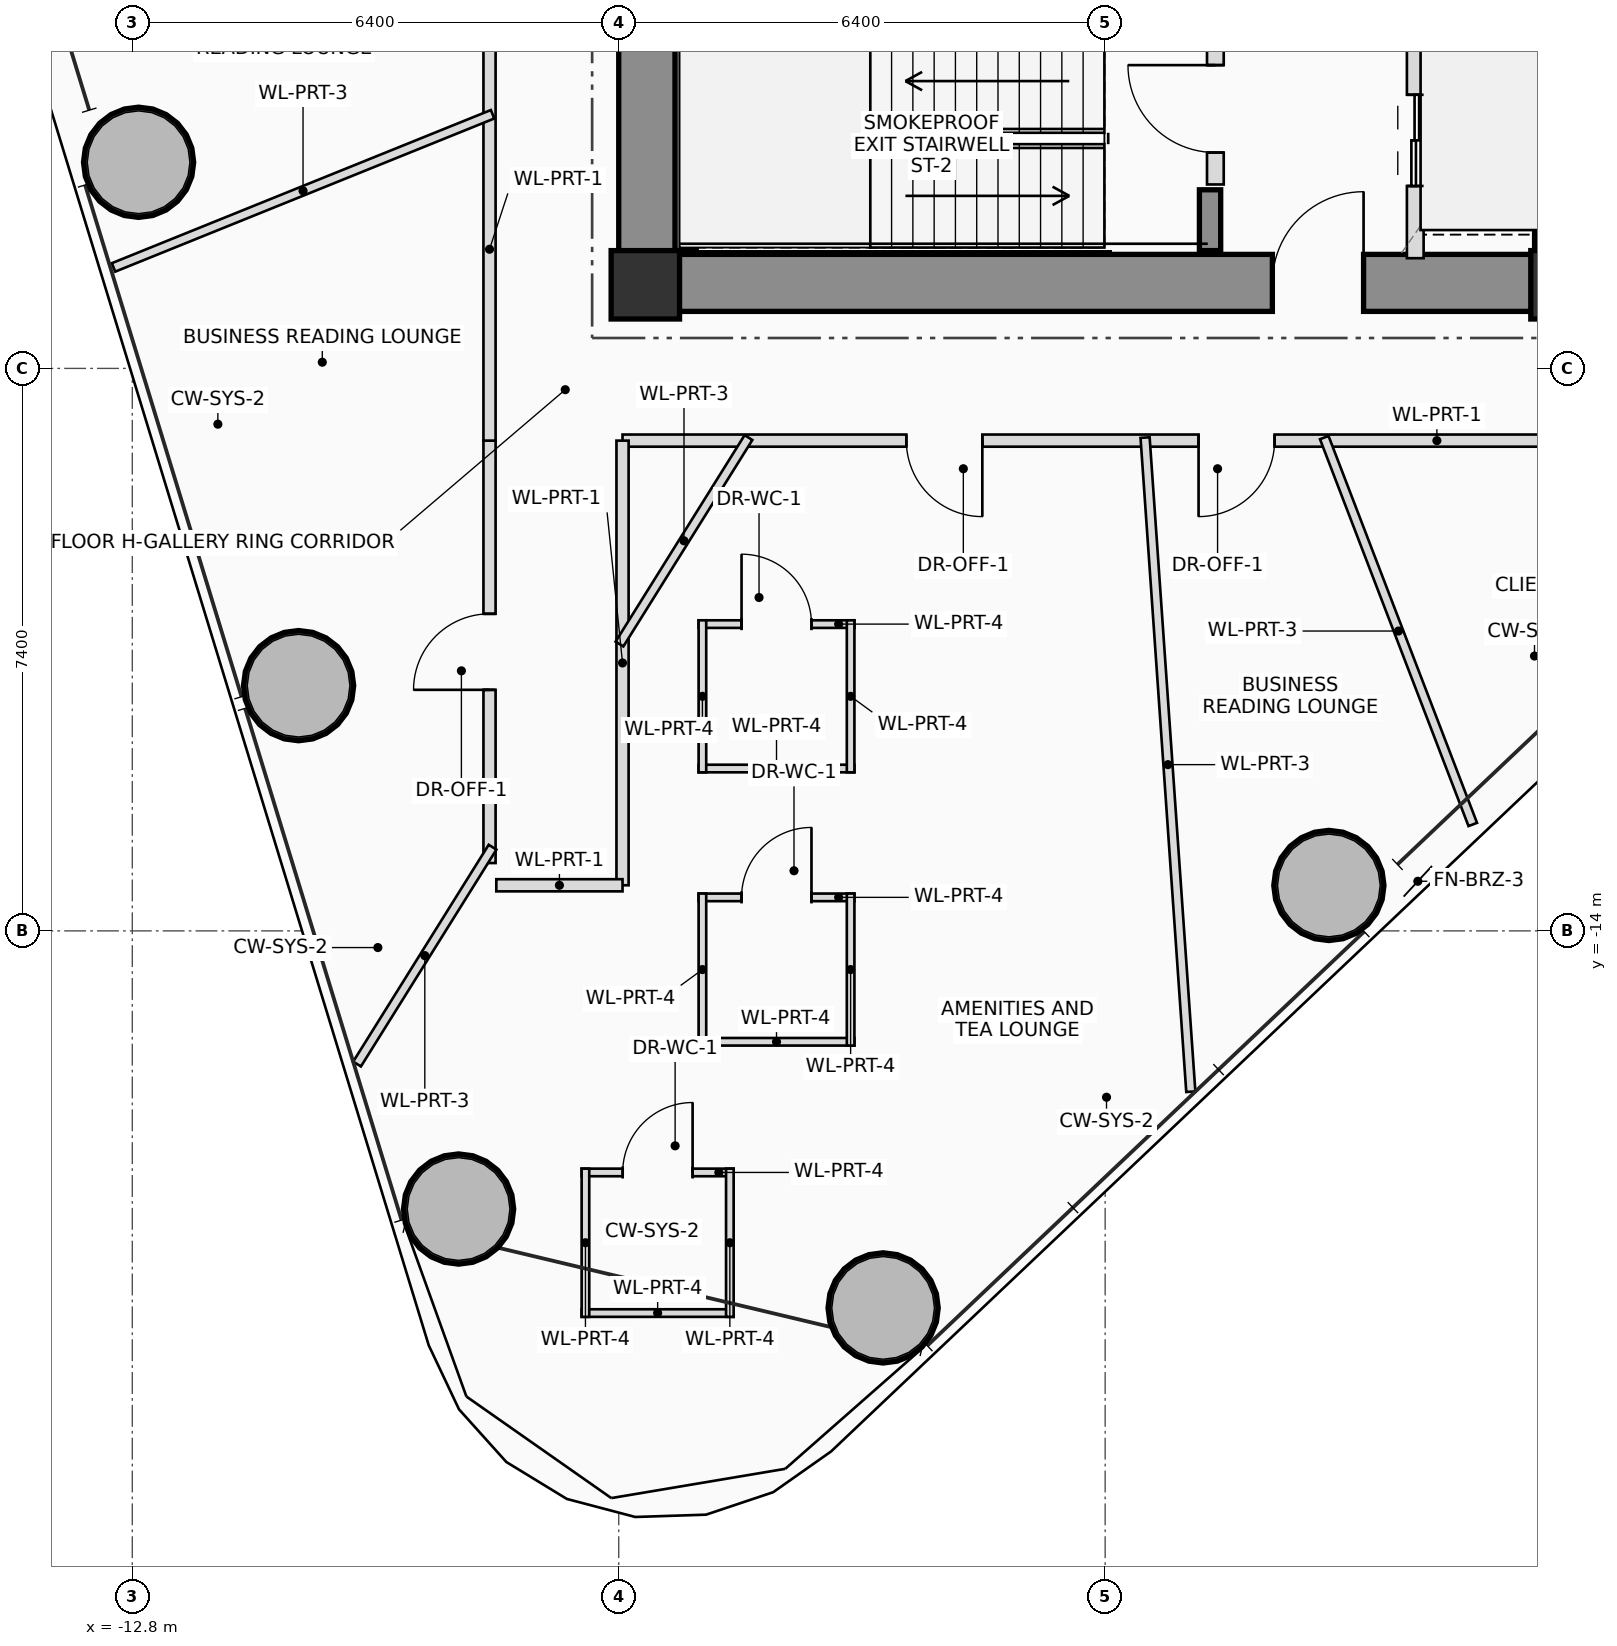
"""IFC4 building model, lengths in metres.
Left out: names, types, materials, properties, quantities, classifications, styles, units other than length and angle.
Written with IfcOpenShell. Run it as: python <this file> out.ifc"""

import sys

from ifc_helpers import new_model, si_unit, direction, frame, frame_2d, origin, origin_2d, place, context, subcontext, project, spatial, rectangle, hollow_circle, extrude, source, transform, mapped, element, fill, save


model = new_model("IFC4")
c1 = context("Model", 3, precision=1e-05, world=origin(), true_north=direction((0.0, 1.0)))
c2 = subcontext(c1, "Body", "Model", "MODEL_VIEW")
j1 = project(units=[si_unit("LENGTHUNIT", "METRE"), si_unit("PLANEANGLEUNIT", "RADIAN")], contexts=[c1])
p1 = place(None, origin())
s1 = spatial("IfcSite", under=j1, at=p1, CompositionType="ELEMENT")
p2 = place(p1, origin())
s2 = spatial("IfcBuilding", under=s1, at=p2, CompositionType="ELEMENT")
p3 = place(p2, frame((0.0, 0.0, 108.65)))
s3 = spatial("IfcBuildingStorey", under=s2, at=p3, CompositionType="ELEMENT", Elevation=108.65)
m1 = source(origin(), c2, "Body", "SweptSolid", [
    extrude(rectangle(XDim=0.9, YDim=0.9, at=origin_2d()), origin(), (0.0, 0.0, 1.0), 3.75),
])
for number, where, z_axis, x_axis in (
    (1, (-6.05, -5.5, 0.0), (0.0, 0.0, 1.0), (1.0, 0.0, 0.0)),
    (2, (6.05, -5.5, 0.0), (0.0, 0.0, 1.0), (1.0, 0.0, 0.0)),
):
    element("IfcColumn", number, at=place(p3, frame(where, z_axis=z_axis, x_axis=x_axis)), inside=s3, PredefinedType="COLUMN", context=c2, shape_type="MappedRepresentation", body=[
        mapped(m1, transform((0.0, 0.0, 0.0), scale=1.0)),
    ])
p4 = place(p3, frame((-6.4, -5.475, 0.0), z_axis=(0.0, 0.0, 1.0), x_axis=(1.0, 0.0, 0.0)))
e3 = element("IfcWall", 3, at=p4, inside=s3, PredefinedType="SHEAR", context=c2, shape_type="SweptSolid", body=[
    extrude(rectangle(XDim=12.8, YDim=0.75, at=frame_2d((6.4, 0.0))), origin(), (0.0, 0.0, 1.0), 3.75),
])
p5 = place(p4, frame((8.6, 0.0, 0.0)))
e4 = element("IfcOpeningElement", 4, at=p5, cuts=e3, PredefinedType="OPENING", context=c2, shape_type="SweptSolid", body=[
    extrude(rectangle(XDim=1.2, YDim=2.2, at=frame_2d((0.6, 1.1))), frame((0.0, 0.385, 0.0), z_axis=(0.0, -1.0, 0.0), x_axis=(1.0, 0.0, 0.0)), (0.0, 0.0, 1.0), 0.77),
])
p6 = place(p3, frame((6.025, -5.1, 0.0), z_axis=(0.0, 0.0, 1.0), x_axis=(0.0, 1.0, 0.0)))
e5 = element("IfcWall", 5, at=p6, inside=s3, PredefinedType="SHEAR", context=c2, shape_type="SweptSolid", body=[
    extrude(rectangle(XDim=10.2, YDim=0.75, at=frame_2d((5.1, 0.0))), origin(), (0.0, 0.0, 1.0), 3.75),
])
p7 = place(p3, frame((-6.025, -5.1, 0.0), z_axis=(0.0, 0.0, 1.0), x_axis=(0.0, 1.0, 0.0)))
e6 = element("IfcWall", 6, at=p7, inside=s3, PredefinedType="SHEAR", context=c2, shape_type="SweptSolid", body=[
    extrude(rectangle(XDim=3.35, YDim=0.75, at=frame_2d((1.675, 0.0))), origin(), (0.0, 0.0, 1.0), 3.75),
])
p8 = place(p3, frame((-5.52, -5.05, 0.0), z_axis=(0.0, 0.0, 1.0), x_axis=(0.0, 1.0, 0.0)))
e7 = element("IfcWall", 7, at=p8, inside=s3, PredefinedType="SHEAR", context=c2, shape_type="SweptSolid", body=[
    extrude(rectangle(XDim=2.75, YDim=0.28, at=frame_2d((1.375, 0.0))), origin(), (0.0, 0.0, 1.0), 3.75),
])
p9 = place(p3, frame((1.38, -5.05, 0.0), z_axis=(0.0, 0.0, 1.0), x_axis=(0.0, 1.0, 0.0)))
e8 = element("IfcWall", 8, at=p9, inside=s3, PredefinedType="SHEAR", context=c2, shape_type="SweptSolid", body=[
    extrude(rectangle(XDim=0.8, YDim=0.28, at=frame_2d((0.4, 0.0))), origin(), (0.0, 0.0, 1.0), 3.75),
])
m2 = source(origin(), c2, "Body", "SweptSolid", [
    extrude(hollow_circle(Radius=0.725, WallThickness=0.05, at=origin_2d()), origin(), (0.0, 0.0, 1.0), 3.75),
])
for number, where, z_axis, x_axis in (
    (9, (-2.921, -18.96, 0.0), (0.0, 0.0, 1.0), (1.0, 0.0, 0.0)),
    (10, (2.943, -13.402, 0.0), (0.0, 0.0, 1.0), (1.0, 0.0, 0.0)),
    (11, (-12.717, -3.888, 0.0), (0.0, 0.0, 1.0), (1.0, 0.0, 0.0)),
    (12, (-10.612, -10.774, 0.0), (0.0, 0.0, 1.0), (1.0, 0.0, 0.0)),
    (13, (-8.507, -17.659, 0.0), (0.0, 0.0, 1.0), (1.0, 0.0, 0.0)),
):
    element("IfcColumn", number, at=place(p3, frame(where, z_axis=z_axis, x_axis=x_axis)), inside=s3, PredefinedType="COLUMN", context=c2, shape_type="MappedRepresentation", body=[
        mapped(m2, transform((0.0, 0.0, 0.0), scale=1.0)),
    ])
p10 = place(p3, frame((1.45, -4.18, 0.0), z_axis=(0.0, 0.0, 1.0), x_axis=(0.0, 1.0, 0.0)))
e14 = element("IfcWall", 14, at=p10, inside=s3, PredefinedType="PLUMBINGWALL", context=c2, shape_type="SweptSolid", body=[
    extrude(rectangle(XDim=1.98, YDim=0.22, at=frame_2d((0.99, 0.0))), origin(), (0.0, 0.0, 1.0), 3.545),
])
p11 = place(p10, frame((0.42, 0.0, 0.0)))
e15 = element("IfcOpeningElement", 15, at=p11, cuts=e14, PredefinedType="OPENING", context=c2, shape_type="SweptSolid", body=[
    extrude(rectangle(XDim=1.15, YDim=2.15, at=frame_2d((0.575, 1.075))), frame((0.0, 0.12, 0.0), z_axis=(0.0, -1.0, 0.0), x_axis=(1.0, 0.0, 0.0)), (0.0, 0.0, 1.0), 0.24),
])
p12 = place(p3, frame((4.08, -5.15, 0.0), z_axis=(0.0, 0.0, 1.0), x_axis=(0.0, 1.0, 0.0)))
e16 = element("IfcWall", 16, at=p12, inside=s3, PredefinedType="PLUMBINGWALL", context=c2, shape_type="SweptSolid", body=[
    extrude(rectangle(XDim=2.95, YDim=0.22, at=frame_2d((1.475, 0.0))), origin(), (0.0, 0.0, 1.0), 3.545),
])
p13 = place(p12, frame((0.95, 0.0, 0.0)))
e17 = element("IfcOpeningElement", 17, at=p13, cuts=e16, PredefinedType="OPENING", context=c2, shape_type="SweptSolid", body=[
    extrude(rectangle(XDim=1.2, YDim=2.25, at=frame_2d((0.6, 1.125))), frame((0.0, 0.12, 0.0), z_axis=(0.0, -1.0, 0.0), x_axis=(1.0, 0.0, 0.0)), (0.0, 0.0, 1.0), 0.24),
])
p14 = place(p3, frame((-5.349, -13.559, 0.0), z_axis=(0.0, 0.0, 1.0), x_axis=(1.0, 0.0, 0.0)))
e18 = element("IfcWall", 18, at=p14, inside=s3, PredefinedType="PARTITIONING", context=c2, shape_type="SweptSolid", body=[
    extrude(rectangle(XDim=2.05, YDim=0.1, at=frame_2d((1.025, 0.0))), origin(), (0.0, 0.0, 1.0), 2.85),
])
p15 = place(p14, frame((0.565, 0.0, 0.0)))
e19 = element("IfcOpeningElement", 19, at=p15, cuts=e18, PredefinedType="OPENING", context=c2, shape_type="SweptSolid", body=[
    extrude(rectangle(XDim=0.92, YDim=2.1, at=frame_2d((0.46, 1.05))), frame((0.0, 0.06, 0.0), z_axis=(0.0, -1.0, 0.0), x_axis=(1.0, 0.0, 0.0)), (0.0, 0.0, 1.0), 0.12),
])
p16 = place(p3, frame((-3.299, -15.459, 0.0), z_axis=(0.0, 0.0, 1.0), x_axis=(-1.0, 0.0, 0.0)))
e20 = element("IfcWall", 20, at=p16, inside=s3, PredefinedType="PARTITIONING", context=c2, shape_type="SweptSolid", body=[
    extrude(rectangle(XDim=2.05, YDim=0.1, at=frame_2d((1.025, 0.0))), origin(), (0.0, 0.0, 1.0), 2.85),
])
for number, where, z_axis, x_axis in (
    (21, (-3.349, -13.509, 0.0), (0.0, 0.0, 1.0), (0.0, -1.0, 0.0)),
    (22, (-5.299, -15.509, 0.0), (0.0, 0.0, 1.0), (0.0, 1.0, 0.0)),
):
    element("IfcWall", number, at=place(p3, frame(where, z_axis=z_axis, x_axis=x_axis)), inside=s3, PredefinedType="PARTITIONING", context=c2, shape_type="SweptSolid", body=[
        extrude(rectangle(XDim=2.0, YDim=0.1, at=frame_2d((1.0, 0.0))), origin(), (0.0, 0.0, 1.0), 3.2),
    ])
p17 = place(p3, frame((-5.349, -9.964, 0.0), z_axis=(0.0, 0.0, 1.0), x_axis=(1.0, 0.0, 0.0)))
e23 = element("IfcWall", 23, at=p17, inside=s3, PredefinedType="PARTITIONING", context=c2, shape_type="SweptSolid", body=[
    extrude(rectangle(XDim=2.05, YDim=0.1, at=frame_2d((1.025, 0.0))), origin(), (0.0, 0.0, 1.0), 2.85),
])
p18 = place(p17, frame((0.565, 0.0, 0.0)))
e24 = element("IfcOpeningElement", 24, at=p18, cuts=e23, PredefinedType="OPENING", context=c2, shape_type="SweptSolid", body=[
    extrude(rectangle(XDim=0.92, YDim=2.1, at=frame_2d((0.46, 1.05))), frame((0.0, 0.06, 0.0), z_axis=(0.0, -1.0, 0.0), x_axis=(1.0, 0.0, 0.0)), (0.0, 0.0, 1.0), 0.12),
])
p19 = place(p3, frame((-3.299, -11.864, 0.0), z_axis=(0.0, 0.0, 1.0), x_axis=(-1.0, 0.0, 0.0)))
e25 = element("IfcWall", 25, at=p19, inside=s3, PredefinedType="PARTITIONING", context=c2, shape_type="SweptSolid", body=[
    extrude(rectangle(XDim=2.05, YDim=0.1, at=frame_2d((1.025, 0.0))), origin(), (0.0, 0.0, 1.0), 2.85),
])
for number, where, z_axis, x_axis in (
    (26, (-3.349, -9.914, 0.0), (0.0, 0.0, 1.0), (0.0, -1.0, 0.0)),
    (27, (-5.299, -11.914, 0.0), (0.0, 0.0, 1.0), (0.0, 1.0, 0.0)),
):
    element("IfcWall", number, at=place(p3, frame(where, z_axis=z_axis, x_axis=x_axis)), inside=s3, PredefinedType="PARTITIONING", context=c2, shape_type="SweptSolid", body=[
        extrude(rectangle(XDim=2.0, YDim=0.1, at=frame_2d((1.0, 0.0))), origin(), (0.0, 0.0, 1.0), 3.2),
    ])
p20 = place(p3, frame((-6.888, -17.178, 0.0), z_axis=(0.0, 0.0, 1.0), x_axis=(1.0, 0.0, 0.0)))
e28 = element("IfcWall", 28, at=p20, inside=s3, PredefinedType="PARTITIONING", context=c2, shape_type="SweptSolid", body=[
    extrude(rectangle(XDim=2.0, YDim=0.1, at=frame_2d((1.0, 0.0))), origin(), (0.0, 0.0, 1.0), 3.545),
])
p21 = place(p20, frame((0.54, 0.0, 0.0)))
e29 = element("IfcOpeningElement", 29, at=p21, cuts=e28, PredefinedType="OPENING", context=c2, shape_type="SweptSolid", body=[
    extrude(rectangle(XDim=0.92, YDim=2.1, at=frame_2d((0.46, 1.05))), frame((0.0, 0.06, 0.0), z_axis=(0.0, -1.0, 0.0), x_axis=(1.0, 0.0, 0.0)), (0.0, 0.0, 1.0), 0.12),
])
p22 = place(p3, frame((-4.888, -19.028, 0.0), z_axis=(0.0, 0.0, 1.0), x_axis=(-1.0, 0.0, 0.0)))
e30 = element("IfcWall", 30, at=p22, inside=s3, PredefinedType="PARTITIONING", context=c2, shape_type="SweptSolid", body=[
    extrude(rectangle(XDim=2.0, YDim=0.1, at=frame_2d((1.0, 0.0))), origin(), (0.0, 0.0, 1.0), 3.545),
])
for number, where, z_axis, x_axis in (
    (31, (-4.938, -17.128, 0.0), (0.0, 0.0, 1.0), (0.0, -1.0, 0.0)),
    (32, (-6.838, -19.078, 0.0), (0.0, 0.0, 1.0), (0.0, 1.0, 0.0)),
):
    element("IfcWall", number, at=place(p3, frame(where, z_axis=z_axis, x_axis=x_axis)), inside=s3, PredefinedType="PARTITIONING", context=c2, shape_type="SweptSolid", body=[
        extrude(rectangle(XDim=1.95, YDim=0.1, at=frame_2d((0.975, 0.0))), origin(), (0.0, 0.0, 1.0), 3.01),
    ])
p23 = place(p3, frame((-8.1, -13.107, 0.0), z_axis=(0.0, 0.0, 1.0), x_axis=(0.0, 1.0, 0.0)))
e33 = element("IfcWall", 33, at=p23, inside=s3, PredefinedType="PARTITIONING", context=c2, shape_type="SweptSolid", body=[
    extrude(rectangle(XDim=5.557, YDim=0.16, at=frame_2d((2.779, 0.0))), origin(), (0.0, 0.0, 1.0), 2.85),
])
p24 = place(p23, frame((2.279, 0.0, 0.0)))
e34 = element("IfcOpeningElement", 34, at=p24, cuts=e33, PredefinedType="OPENING", context=c2, shape_type="SweptSolid", body=[
    extrude(rectangle(XDim=1.0, YDim=2.25, at=frame_2d((0.5, 1.125))), frame((0.0, 0.09, 0.0), z_axis=(0.0, -1.0, 0.0), x_axis=(1.0, 0.0, 0.0)), (0.0, 0.0, 1.0), 0.18),
])
p25 = place(p3, frame((-8.1, -7.55, 0.0), z_axis=(0.0, 0.0, 1.0), x_axis=(0.0, 1.0, 0.0)))
e35 = element("IfcWall", 35, at=p25, inside=s3, PredefinedType="PARTITIONING", context=c2, shape_type="SweptSolid", body=[
    extrude(rectangle(XDim=15.1, YDim=0.16, at=frame_2d((7.55, 0.0))), origin(), (0.0, 0.0, 1.0), 2.85),
])
p26 = place(p25, frame((5.185, 0.0, 0.0)))
e36 = element("IfcOpeningElement", 36, at=p26, cuts=e35, PredefinedType="OPENING", context=c2, shape_type="SweptSolid", body=[
    extrude(rectangle(XDim=1.0, YDim=2.25, at=frame_2d((0.5, 1.125))), frame((0.0, 0.09, 0.0), z_axis=(0.0, -1.0, 0.0), x_axis=(1.0, 0.0, 0.0)), (0.0, 0.0, 1.0), 0.18),
])
p27 = place(p25, frame((9.39, 0.0, 0.0)))
e37 = element("IfcOpeningElement", 37, at=p27, cuts=e35, PredefinedType="OPENING", context=c2, shape_type="SweptSolid", body=[
    extrude(rectangle(XDim=1.0, YDim=2.25, at=frame_2d((0.5, 1.125))), frame((0.0, 0.09, 0.0), z_axis=(0.0, -1.0, 0.0), x_axis=(1.0, 0.0, 0.0)), (0.0, 0.0, 1.0), 0.18),
])
p28 = place(p25, frame((13.607, 0.0, 0.0)))
e38 = element("IfcOpeningElement", 38, at=p28, cuts=e35, PredefinedType="OPENING", context=c2, shape_type="SweptSolid", body=[
    extrude(rectangle(XDim=1.0, YDim=2.25, at=frame_2d((0.5, 1.125))), frame((0.0, 0.09, 0.0), z_axis=(0.0, -1.0, 0.0), x_axis=(1.0, 0.0, 0.0)), (0.0, 0.0, 1.0), 0.18),
])
p29 = place(p3, frame((6.35, -7.55, 0.0), z_axis=(0.0, 0.0, 1.0), x_axis=(-1.0, 0.0, 0.0)))
e39 = element("IfcWall", 39, at=p29, inside=s3, PredefinedType="PARTITIONING", context=c2, shape_type="SweptSolid", body=[
    extrude(rectangle(XDim=12.7, YDim=0.16, at=frame_2d((6.35, 0.0))), origin(), (0.0, 0.0, 1.0), 2.85),
])
p30 = place(p29, frame((4.121, 0.0, 0.0)))
e40 = element("IfcOpeningElement", 40, at=p30, cuts=e39, PredefinedType="OPENING", context=c2, shape_type="SweptSolid", body=[
    extrude(rectangle(XDim=1.0, YDim=2.25, at=frame_2d((0.5, 1.125))), frame((0.0, 0.09, 0.0), z_axis=(0.0, -1.0, 0.0), x_axis=(1.0, 0.0, 0.0)), (0.0, 0.0, 1.0), 0.18),
])
p31 = place(p29, frame((7.966, 0.0, 0.0)))
e41 = element("IfcOpeningElement", 41, at=p31, cuts=e39, PredefinedType="OPENING", context=c2, shape_type="SweptSolid", body=[
    extrude(rectangle(XDim=1.0, YDim=2.25, at=frame_2d((0.5, 1.125))), frame((0.0, 0.09, 0.0), z_axis=(0.0, -1.0, 0.0), x_axis=(1.0, 0.0, 0.0)), (0.0, 0.0, 1.0), 0.18),
])
p32 = place(p3, frame((-6.35, -7.55, 0.0), z_axis=(0.0, 0.0, 1.0), x_axis=(0.0, -1.0, 0.0)))
e42 = element("IfcWall", 42, at=p32, inside=s3, PredefinedType="PARTITIONING", context=c2, shape_type="SweptSolid", body=[
    extrude(rectangle(XDim=5.85, YDim=0.16, at=frame_2d((2.925, 0.0))), origin(), (0.0, 0.0, 1.0), 2.85),
])
p33 = place(p3, frame((-6.35, -13.4, 0.0), z_axis=(0.0, 0.0, 1.0), x_axis=(-1.0, 0.0, 0.0)))
e43 = element("IfcWall", 43, at=p33, inside=s3, PredefinedType="PARTITIONING", context=c2, shape_type="SweptSolid", body=[
    extrude(rectangle(XDim=1.66, YDim=0.16, at=frame_2d((0.83, 0.0))), origin(), (0.0, 0.0, 1.0), 2.85),
])
p34 = place(p3, frame((-8.06, -3.257, 0.0), z_axis=(0.0, 0.0, 1.0), x_axis=(-0.927184543748, -0.374604887627, 0.0)))
e44 = element("IfcWall", 44, at=p34, inside=s3, PredefinedType="PARTITIONING", context=c2, shape_type="SweptSolid", body=[
    extrude(rectangle(XDim=5.379, YDim=0.12, at=frame_2d((2.689, 0.0))), origin(), (0.0, 0.0, 1.0), 2.85),
])
p35 = place(p3, frame((-4.693, -7.51, 0.0), z_axis=(0.0, 0.0, 1.0), x_axis=(-0.529882447014, -0.848071100997, 0.0)))
e45 = element("IfcWall", 45, at=p35, inside=s3, PredefinedType="PARTITIONING", context=c2, shape_type="SweptSolid", body=[
    extrude(rectangle(XDim=3.203, YDim=0.12, at=frame_2d((1.601, 0.0))), origin(), (0.0, 0.0, 1.0), 2.85),
])
p36 = place(p3, frame((-8.06, -12.899, 0.0), z_axis=(0.0, 0.0, 1.0), x_axis=(-0.529927190475, -0.84804314324, 0.0)))
e46 = element("IfcWall", 46, at=p36, inside=s3, PredefinedType="PARTITIONING", context=c2, shape_type="SweptSolid", body=[
    extrude(rectangle(XDim=3.365, YDim=0.12, at=frame_2d((1.682, 0.0))), origin(), (0.0, 0.0, 1.0), 3.01),
])
p37 = place(p3, frame((0.525, -7.51, 0.0), z_axis=(0.0, 0.0, 1.0), x_axis=(0.069760692691, -0.997563755233, 0.0)))
e47 = element("IfcWall", 47, at=p37, inside=s3, PredefinedType="PARTITIONING", context=c2, shape_type="SweptSolid", body=[
    extrude(rectangle(XDim=8.627, YDim=0.12, at=frame_2d((4.313, 0.0))), origin(), (0.0, 0.0, 1.0), 3.01),
])
p38 = place(p3, frame((2.883, -7.51, 0.0), z_axis=(0.0, 0.0, 1.0), x_axis=(0.35836087515, -0.933583142072, 0.0)))
e48 = element("IfcWall", 48, at=p38, inside=s3, PredefinedType="PARTITIONING", context=c2, shape_type="SweptSolid", body=[
    extrude(rectangle(XDim=5.452, YDim=0.12, at=frame_2d((2.726, 0.0))), origin(), (0.0, 0.0, 1.0), 2.85),
])
p39 = place(p5, origin())
e49 = element("IfcDoor", 49, at=p39, inside=s3, OperationType="SINGLE_SWING_RIGHT", PredefinedType="DOOR", context=c2, shape_type="SweptSolid", body=[
    extrude(rectangle(XDim=1.2, YDim=2.2, at=frame_2d((0.6, 1.1))), frame((0.0, 0.025, 0.0), z_axis=(0.0, -1.0, 0.0), x_axis=(1.0, 0.0, 0.0)), (0.0, 0.0, 1.0), 0.05),
])
fill(e4, e49)
p40 = place(p11, origin())
e50 = element("IfcDoor", 50, at=p40, inside=s3, OperationType="SINGLE_SWING_RIGHT", PredefinedType="DOOR", context=c2, shape_type="SweptSolid", body=[
    extrude(rectangle(XDim=1.15, YDim=2.15, at=frame_2d((0.575, 1.075))), frame((0.0, 0.025, 0.0), z_axis=(0.0, -1.0, 0.0), x_axis=(1.0, 0.0, 0.0)), (0.0, 0.0, 1.0), 0.05),
])
fill(e15, e50)
p41 = place(p13, origin())
e51 = element("IfcDoor", 51, at=p41, inside=s3, OperationType="DOUBLE_DOOR_SLIDING", PredefinedType="DOOR", context=c2, shape_type="SweptSolid", body=[
    extrude(rectangle(XDim=1.2, YDim=2.25, at=frame_2d((0.6, 1.125))), frame((0.0, 0.025, 0.0), z_axis=(0.0, -1.0, 0.0), x_axis=(1.0, 0.0, 0.0)), (0.0, 0.0, 1.0), 0.05),
])
fill(e17, e51)
p42 = place(p15, origin())
e52 = element("IfcDoor", 52, at=p42, inside=s3, OperationType="SINGLE_SWING_RIGHT", PredefinedType="DOOR", context=c2, shape_type="SweptSolid", body=[
    extrude(rectangle(XDim=0.92, YDim=2.1, at=frame_2d((0.46, 1.05))), frame((0.0, 0.025, 0.0), z_axis=(0.0, -1.0, 0.0), x_axis=(1.0, 0.0, 0.0)), (0.0, 0.0, 1.0), 0.05),
])
fill(e19, e52)
p43 = place(p18, origin())
e53 = element("IfcDoor", 53, at=p43, inside=s3, OperationType="SINGLE_SWING_LEFT", PredefinedType="DOOR", context=c2, shape_type="SweptSolid", body=[
    extrude(rectangle(XDim=0.92, YDim=2.1, at=frame_2d((0.46, 1.05))), frame((0.0, 0.025, 0.0), z_axis=(0.0, -1.0, 0.0), x_axis=(1.0, 0.0, 0.0)), (0.0, 0.0, 1.0), 0.05),
])
fill(e24, e53)
p44 = place(p21, origin())
e54 = element("IfcDoor", 54, at=p44, inside=s3, OperationType="SINGLE_SWING_RIGHT", PredefinedType="DOOR", context=c2, shape_type="SweptSolid", body=[
    extrude(rectangle(XDim=0.92, YDim=2.1, at=frame_2d((0.46, 1.05))), frame((0.0, 0.025, 0.0), z_axis=(0.0, -1.0, 0.0), x_axis=(1.0, 0.0, 0.0)), (0.0, 0.0, 1.0), 0.05),
])
fill(e29, e54)
p45 = place(p24, origin())
e55 = element("IfcDoor", 55, at=p45, inside=s3, OperationType="SINGLE_SWING_LEFT", PredefinedType="DOOR", context=c2, shape_type="SweptSolid", body=[
    extrude(rectangle(XDim=1.0, YDim=2.25, at=frame_2d((0.5, 1.125))), frame((0.0, 0.025, 0.0), z_axis=(0.0, -1.0, 0.0), x_axis=(1.0, 0.0, 0.0)), (0.0, 0.0, 1.0), 0.05),
])
fill(e34, e55)
p46 = place(p30, origin())
e56 = element("IfcDoor", 56, at=p46, inside=s3, OperationType="SINGLE_SWING_RIGHT", PredefinedType="DOOR", context=c2, shape_type="SweptSolid", body=[
    extrude(rectangle(XDim=1.0, YDim=2.25, at=frame_2d((0.5, 1.125))), frame((0.0, 0.025, 0.0), z_axis=(0.0, -1.0, 0.0), x_axis=(1.0, 0.0, 0.0)), (0.0, 0.0, 1.0), 0.05),
])
fill(e40, e56)
p47 = place(p31, origin())
e57 = element("IfcDoor", 57, at=p47, inside=s3, OperationType="SINGLE_SWING_LEFT", PredefinedType="DOOR", context=c2, shape_type="SweptSolid", body=[
    extrude(rectangle(XDim=1.0, YDim=2.25, at=frame_2d((0.5, 1.125))), frame((0.0, 0.025, 0.0), z_axis=(0.0, -1.0, 0.0), x_axis=(1.0, 0.0, 0.0)), (0.0, 0.0, 1.0), 0.05),
])
fill(e41, e57)
save(model, sys.argv[1])
